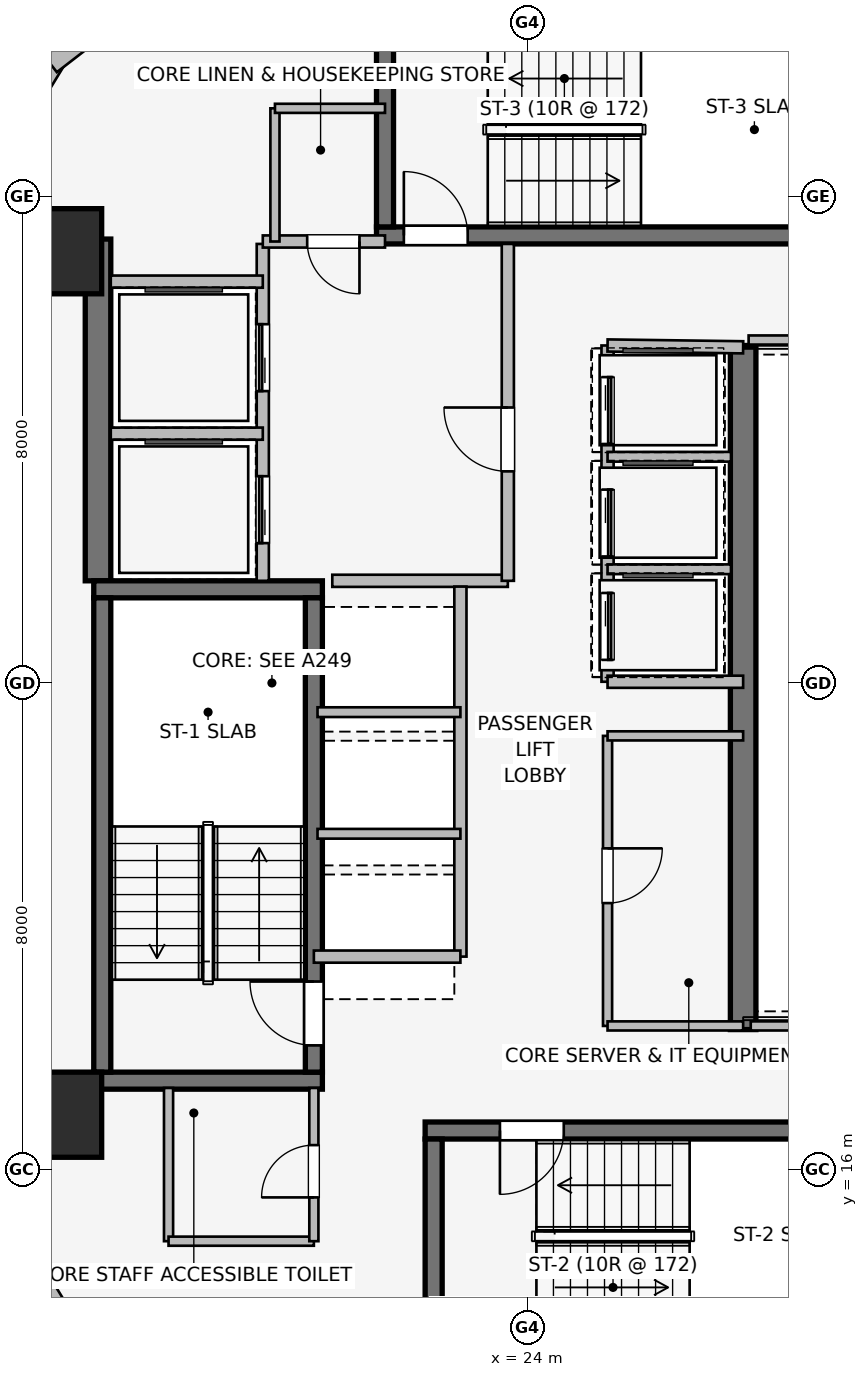
"""IFC4 building model, lengths in metres.
Left out: names, types, materials, properties, quantities, classifications, styles, units other than length and angle.
Written with IfcOpenShell. Run it as: python <this file> out.ifc"""

import sys

from ifc_helpers import new_model, si_unit, direction, frame, frame_2d, origin, origin_2d, place, context, subcontext, project, spatial, rectangle, extrude, element, fill, save


model = new_model("IFC4")
c1 = context("Model", 3, precision=1e-05, world=origin(), true_north=direction((0.0, 1.0)))
c2 = subcontext(c1, "Body", "Model", "MODEL_VIEW")
j1 = project(units=[si_unit("LENGTHUNIT", "METRE"), si_unit("PLANEANGLEUNIT", "RADIAN")], contexts=[c1])
p1 = place(None, origin())
s1 = spatial("IfcSite", under=j1, at=p1, CompositionType="ELEMENT")
p2 = place(p1, origin())
s2 = spatial("IfcBuilding", under=s1, at=p2, CompositionType="ELEMENT")
p3 = place(p2, frame((0.0, 0.0, 174.0)))
s3 = spatial("IfcBuildingStorey", under=s2, at=p3, CompositionType="ELEMENT", Elevation=174.0)
p4 = place(p3, frame((16.94, 25.68, 0.0), z_axis=(0.0, 0.0, 1.0), x_axis=(0.0, 1.0, 0.0)))
e1 = element("IfcWall", 1, at=p4, inside=s3, PredefinedType="SHEAR", context=c2, shape_type="SweptSolid", body=[
    extrude(rectangle(XDim=5.62, YDim=0.42, at=frame_2d((2.81, 0.0))), origin(), (0.0, 0.0, 1.0), 3.45),
])
p5 = place(p3, frame((27.55, 29.55, 0.0), z_axis=(0.0, 0.0, 1.0), x_axis=(0.0, -1.0, 0.0)))
e2 = element("IfcWall", 2, at=p5, inside=s3, PredefinedType="SHEAR", context=c2, shape_type="SweptSolid", body=[
    extrude(rectangle(XDim=11.25, YDim=0.42, at=frame_2d((5.625, 0.0))), origin(), (0.0, 0.0, 1.0), 3.45),
])
for number, where, z_axis, x_axis in (
    (3, (16.87, 17.46, 0.0), (0.0, 0.0, 1.0), (1.0, 0.0, 0.0)),
    (4, (20.63, 25.54, 0.0), (0.0, 0.0, 1.0), (-1.0, 0.0, 0.0)),
):
    element("IfcWall", number, at=place(p3, frame(where, z_axis=z_axis, x_axis=x_axis)), inside=s3, PredefinedType="SHEAR", context=c2, shape_type="SweptSolid", body=[
        extrude(rectangle(XDim=3.76, YDim=0.28, at=frame_2d((1.88, 0.0))), origin(), (0.0, 0.0, 1.0), 3.45),
    ])
p6 = place(p3, frame((17.01, 25.4, 0.0), z_axis=(0.0, 0.0, 1.0), x_axis=(0.0, -1.0, 0.0)))
e5 = element("IfcWall", 5, at=p6, inside=s3, PredefinedType="SHEAR", context=c2, shape_type="SweptSolid", body=[
    extrude(rectangle(XDim=7.8, YDim=0.28, at=frame_2d((3.9, 0.0))), origin(), (0.0, 0.0, 1.0), 3.45),
])
p7 = place(p3, frame((20.49, 17.6, 0.0), z_axis=(0.0, 0.0, 1.0), x_axis=(0.0, 1.0, 0.0)))
e6 = element("IfcWall", 6, at=p7, inside=s3, PredefinedType="SHEAR", context=c2, shape_type="SweptSolid", body=[
    extrude(rectangle(XDim=7.8, YDim=0.28, at=frame_2d((3.9, 0.0))), origin(), (0.0, 0.0, 1.0), 3.45),
])
p8 = place(p7, frame((0.44, 0.0, 0.0)))
e7 = element("IfcOpeningElement", 7, at=p8, cuts=e6, PredefinedType="OPENING", context=c2, shape_type="SweptSolid", body=[
    extrude(rectangle(XDim=1.05, YDim=2.0, at=frame_2d((0.525, 1.0))), frame((0.0, 0.15, 0.0), z_axis=(0.0, -1.0, 0.0), x_axis=(1.0, 0.0, 0.0)), (0.0, 0.0, 1.0), 0.3),
])
p9 = place(p3, frame((30.68, 16.64, 0.0), z_axis=(0.0, 0.0, 1.0), x_axis=(-1.0, 0.0, 0.0)))
e8 = element("IfcWall", 8, at=p9, inside=s3, PredefinedType="SHEAR", context=c2, shape_type="SweptSolid", body=[
    extrude(rectangle(XDim=8.36, YDim=0.28, at=frame_2d((4.18, 0.0))), origin(), (0.0, 0.0, 1.0), 3.45),
])
p10 = place(p9, frame((6.08, 0.0, 0.0)))
e9 = element("IfcOpeningElement", 9, at=p10, cuts=e8, PredefinedType="OPENING", context=c2, shape_type="SweptSolid", body=[
    extrude(rectangle(XDim=1.05, YDim=2.0, at=frame_2d((0.525, 1.0))), frame((0.0, 0.15, 0.0), z_axis=(0.0, -1.0, 0.0), x_axis=(1.0, 0.0, 0.0)), (0.0, 0.0, 1.0), 0.3),
])
p11 = place(p3, frame((22.46, 16.5, 0.0), z_axis=(0.0, 0.0, 1.0), x_axis=(0.0, -1.0, 0.0)))
e10 = element("IfcWall", 10, at=p11, inside=s3, PredefinedType="SHEAR", context=c2, shape_type="SweptSolid", body=[
    extrude(rectangle(XDim=3.2, YDim=0.28, at=frame_2d((1.6, 0.0))), origin(), (0.0, 0.0, 1.0), 3.45),
])
p12 = place(p3, frame((21.52, 31.36, 0.0), z_axis=(0.0, 0.0, 1.0), x_axis=(1.0, 0.0, 0.0)))
e11 = element("IfcWall", 11, at=p12, inside=s3, PredefinedType="SHEAR", context=c2, shape_type="SweptSolid", body=[
    extrude(rectangle(XDim=8.36, YDim=0.28, at=frame_2d((4.18, 0.0))), origin(), (0.0, 0.0, 1.0), 3.45),
])
p13 = place(p12, frame((0.45, 0.0, 0.0)))
e12 = element("IfcOpeningElement", 12, at=p13, cuts=e11, PredefinedType="OPENING", context=c2, shape_type="SweptSolid", body=[
    extrude(rectangle(XDim=1.05, YDim=2.0, at=frame_2d((0.525, 1.0))), frame((0.0, 0.15, 0.0), z_axis=(0.0, -1.0, 0.0), x_axis=(1.0, 0.0, 0.0)), (0.0, 0.0, 1.0), 0.3),
])
p14 = place(p3, frame((21.66, 34.7, 0.0), z_axis=(0.0, 0.0, 1.0), x_axis=(0.0, -1.0, 0.0)))
e13 = element("IfcWall", 13, at=p14, inside=s3, PredefinedType="SHEAR", context=c2, shape_type="SweptSolid", body=[
    extrude(rectangle(XDim=3.2, YDim=0.28, at=frame_2d((1.6, 0.0))), origin(), (0.0, 0.0, 1.0), 3.45),
])
for number, where, z_axis, x_axis in (
    (14, (16.3, 16.9, 0.0), (0.0, 0.0, 1.0), (1.0, 0.0, 0.0)),
    (15, (16.3, 31.1, 0.0), (0.0, 0.0, 1.0), (1.0, 0.0, 0.0)),
):
    element("IfcColumn", number, at=place(p3, frame(where, z_axis=z_axis, x_axis=x_axis)), inside=s3, PredefinedType="COLUMN", context=c2, shape_type="SweptSolid", body=[
        extrude(rectangle(XDim=1.4, YDim=1.4, at=origin_2d()), origin(), (0.0, 0.0, 1.0), 3.45),
    ])
p15 = place(p3, frame((15.415, 32.882, 0.0), z_axis=(0.0, 0.0, 1.0), x_axis=(0.520325409202, 0.853968072318, 0.0)))
e16 = element("IfcWall", 16, at=p15, inside=s3, PredefinedType="STANDARD", context=c2, shape_type="SweptSolid", body=[
    extrude(rectangle(XDim=1.678, YDim=0.33, at=frame_2d((0.839, 0.0))), origin(), (0.0, 0.0, 1.0), 3.16),
])
for number, where, z_axis, x_axis in (
    (17, (16.162, 34.175, 0.0), (0.0, 0.0, 1.0), (0.791, 0.611, 0.0)),
    (18, (17.489, 12.8, 0.0), (0.0, 0.0, 1.0), (-0.791, 0.611, 0.0)),
):
    element("IfcWall", number, at=place(p3, frame(where, z_axis=z_axis, x_axis=x_axis)), inside=s3, PredefinedType="STANDARD", context=c2, shape_type="SweptSolid", body=[
        extrude(rectangle(XDim=1.677, YDim=0.33, at=frame_2d((0.838, 0.0))), origin(), (0.0, 0.0, 1.0), 3.16),
    ])
p16 = place(p3, frame((16.288, 13.685, 0.0), z_axis=(0.0, 0.0, 1.0), x_axis=(-0.520325409202, 0.853968072318, 0.0)))
e19 = element("IfcWall", 19, at=p16, inside=s3, PredefinedType="STANDARD", context=c2, shape_type="SweptSolid", body=[
    extrude(rectangle(XDim=1.678, YDim=0.33, at=frame_2d((0.839, 0.0))), origin(), (0.0, 0.0, 1.0), 3.16),
])
p17 = place(p3, frame((19.65, 25.68, 0.0), z_axis=(0.0, 0.0, 1.0), x_axis=(0.0, 1.0, 0.0)))
e20 = element("IfcWall", 20, at=p17, inside=s3, PredefinedType="PARTITIONING", context=c2, shape_type="SweptSolid", body=[
    extrude(rectangle(XDim=5.54, YDim=0.2, at=frame_2d((2.77, 0.0))), origin(), (0.0, 0.0, 1.0), 3.16),
])
p18 = place(p17, frame((0.62, 0.0, 0.0)))
e21 = element("IfcOpeningElement", 21, at=p18, cuts=e20, PredefinedType="OPENING", context=c2, shape_type="SweptSolid", body=[
    extrude(rectangle(XDim=1.1, YDim=2.2, at=frame_2d((0.55, 1.1))), frame((0.0, 0.11, 0.0), z_axis=(0.0, -1.0, 0.0), x_axis=(1.0, 0.0, 0.0)), (0.0, 0.0, 1.0), 0.22),
])
p19 = place(p17, frame((3.12, 0.0, 0.0)))
e22 = element("IfcOpeningElement", 22, at=p19, cuts=e20, PredefinedType="OPENING", context=c2, shape_type="SweptSolid", body=[
    extrude(rectangle(XDim=1.1, YDim=2.2, at=frame_2d((0.55, 1.1))), frame((0.0, 0.11, 0.0), z_axis=(0.0, -1.0, 0.0), x_axis=(1.0, 0.0, 0.0)), (0.0, 0.0, 1.0), 0.22),
])
p20 = place(p3, frame((20.793, 25.68, 0.0), z_axis=(0.0, 0.0, 1.0), x_axis=(1.0, 0.0, 0.0)))
e23 = element("IfcWall", 23, at=p20, inside=s3, PredefinedType="PARTITIONING", context=c2, shape_type="SweptSolid", body=[
    extrude(rectangle(XDim=2.887, YDim=0.2, at=frame_2d((1.443, 0.0))), origin(), (0.0, 0.0, 1.0), 3.16),
])
p21 = place(p3, frame((23.68, 25.68, 0.0), z_axis=(0.0, 0.0, 1.0), x_axis=(0.0, 1.0, 0.0)))
e24 = element("IfcWall", 24, at=p21, inside=s3, PredefinedType="PARTITIONING", context=c2, shape_type="SweptSolid", body=[
    extrude(rectangle(XDim=5.54, YDim=0.2, at=frame_2d((2.77, 0.0))), origin(), (0.0, 0.0, 1.0), 3.16),
])
p22 = place(p21, frame((1.8, 0.0, 0.0)))
e25 = element("IfcOpeningElement", 25, at=p22, cuts=e24, PredefinedType="OPENING", context=c2, shape_type="SweptSolid", body=[
    extrude(rectangle(XDim=1.05, YDim=2.0, at=frame_2d((0.525, 1.0))), frame((0.0, 0.11, 0.0), z_axis=(0.0, -1.0, 0.0), x_axis=(1.0, 0.0, 0.0)), (0.0, 0.0, 1.0), 0.22),
])
p23 = place(p3, frame((21.66, 31.26, 0.0), z_axis=(0.0, 0.0, 1.0), x_axis=(-1.0, 0.0, 0.0)))
e26 = element("IfcWall", 26, at=p23, inside=s3, PredefinedType="PARTITIONING", context=c2, shape_type="SweptSolid", body=[
    extrude(rectangle(XDim=2.01, YDim=0.2, at=frame_2d((1.005, 0.0))), origin(), (0.0, 0.0, 1.0), 3.16),
])
p24 = place(p23, frame((0.42, 0.0, 0.0)))
e27 = element("IfcOpeningElement", 27, at=p24, cuts=e26, PredefinedType="OPENING", context=c2, shape_type="SweptSolid", body=[
    extrude(rectangle(XDim=0.86, YDim=2.0, at=frame_2d((0.43, 1.0))), frame((0.0, 0.11, 0.0), z_axis=(0.0, -1.0, 0.0), x_axis=(1.0, 0.0, 0.0)), (0.0, 0.0, 1.0), 0.22),
])
p25 = place(p3, frame((17.15, 28.1, 0.0), z_axis=(0.0, 0.0, 1.0), x_axis=(1.0, 0.0, 0.0)))
e28 = element("IfcWall", 28, at=p25, inside=s3, PredefinedType="PARTITIONING", context=c2, shape_type="SweptSolid", body=[
    extrude(rectangle(XDim=2.5, YDim=0.2, at=frame_2d((1.25, 0.0))), origin(), (0.0, 0.0, 1.0), 3.16),
])
p26 = place(p3, frame((19.65, 30.6, 0.0), z_axis=(0.0, 0.0, 1.0), x_axis=(-1.0, 0.0, 0.0)))
e29 = element("IfcWall", 29, at=p26, inside=s3, PredefinedType="PARTITIONING", context=c2, shape_type="SweptSolid", body=[
    extrude(rectangle(XDim=2.5, YDim=0.2, at=frame_2d((1.25, 0.0))), origin(), (0.0, 0.0, 1.0), 2.06),
])
p27 = place(p3, frame((22.9, 19.5, 0.0), z_axis=(0.0, 0.0, 1.0), x_axis=(0.0, 1.0, 0.0)))
e30 = element("IfcWall", 30, at=p27, inside=s3, PredefinedType="PARTITIONING", context=c2, shape_type="SweptSolid", body=[
    extrude(rectangle(XDim=6.085, YDim=0.2, at=frame_2d((3.042, 0.0))), origin(), (0.0, 0.0, 1.0), 3.16),
])
p28 = place(p3, frame((20.49, 19.5, 0.0), z_axis=(0.0, 0.0, 1.0), x_axis=(1.0, 0.0, 0.0)))
e31 = element("IfcWall", 31, at=p28, inside=s3, PredefinedType="PARTITIONING", context=c2, shape_type="SweptSolid", body=[
    extrude(rectangle(XDim=2.41, YDim=0.2, at=frame_2d((1.205, 0.0))), origin(), (0.0, 0.0, 1.0), 2.06),
])
for number, where, z_axis, x_axis in (
    (32, (20.55, 21.52, 0.0), (0.0, 0.0, 1.0), (1.0, 0.0, 0.0)),
    (33, (20.55, 23.52, 0.0), (0.0, 0.0, 1.0), (1.0, 0.0, 0.0)),
):
    element("IfcWall", number, at=place(p3, frame(where, z_axis=z_axis, x_axis=x_axis)), inside=s3, PredefinedType="PARTITIONING", context=c2, shape_type="SweptSolid", body=[
        extrude(rectangle(XDim=2.35, YDim=0.16, at=frame_2d((1.175, 0.0))), origin(), (0.0, 0.0, 1.0), 3.16),
    ])
p29 = place(p3, frame((25.32, 29.55, 0.0), z_axis=(0.0, 0.0, 1.0), x_axis=(0.0, -1.0, 0.0)))
e34 = element("IfcWall", 34, at=p29, inside=s3, PredefinedType="PARTITIONING", context=c2, shape_type="SweptSolid", body=[
    extrude(rectangle(XDim=5.53, YDim=0.2, at=frame_2d((2.765, 0.0))), origin(), (0.0, 0.0, 1.0), 3.16),
])
p30 = place(p29, frame((0.52, 0.0, 0.0)))
e35 = element("IfcOpeningElement", 35, at=p30, cuts=e34, PredefinedType="OPENING", context=c2, shape_type="SweptSolid", body=[
    extrude(rectangle(XDim=1.1, YDim=2.2, at=frame_2d((0.55, 1.1))), frame((0.0, 0.11, 0.0), z_axis=(0.0, -1.0, 0.0), x_axis=(1.0, 0.0, 0.0)), (0.0, 0.0, 1.0), 0.22),
])
p31 = place(p29, frame((2.37, 0.0, 0.0)))
e36 = element("IfcOpeningElement", 36, at=p31, cuts=e34, PredefinedType="OPENING", context=c2, shape_type="SweptSolid", body=[
    extrude(rectangle(XDim=1.1, YDim=2.2, at=frame_2d((0.55, 1.1))), frame((0.0, 0.11, 0.0), z_axis=(0.0, -1.0, 0.0), x_axis=(1.0, 0.0, 0.0)), (0.0, 0.0, 1.0), 0.22),
])
p32 = place(p29, frame((4.07, 0.0, 0.0)))
e37 = element("IfcOpeningElement", 37, at=p32, cuts=e34, PredefinedType="OPENING", context=c2, shape_type="SweptSolid", body=[
    extrude(rectangle(XDim=1.1, YDim=2.2, at=frame_2d((0.55, 1.1))), frame((0.0, 0.11, 0.0), z_axis=(0.0, -1.0, 0.0), x_axis=(1.0, 0.0, 0.0)), (0.0, 0.0, 1.0), 0.22),
])
p33 = place(p3, frame((27.55, 29.52, 0.0), z_axis=(0.0, 0.0, 1.0), x_axis=(-0.999909343457, 0.013464949556, 0.0)))
e38 = element("IfcWall", 38, at=p33, inside=s3, PredefinedType="PARTITIONING", context=c2, shape_type="SweptSolid", body=[
    extrude(rectangle(XDim=2.23, YDim=0.2, at=frame_2d((1.115, 0.0))), origin(), (0.0, 0.0, 1.0), 2.06),
])
p34 = place(p3, frame((25.32, 24.02, 0.0), z_axis=(0.0, 0.0, 1.0), x_axis=(1.0, 0.0, 0.0)))
e39 = element("IfcWall", 39, at=p34, inside=s3, PredefinedType="PARTITIONING", context=c2, shape_type="SweptSolid", body=[
    extrude(rectangle(XDim=2.23, YDim=0.2, at=frame_2d((1.115, 0.0))), origin(), (0.0, 0.0, 1.0), 3.16),
])
for number, where, z_axis, x_axis in (
    (40, (25.32, 25.87, 0.0), (0.0, 0.0, 1.0), (1.0, 0.0, 0.0)),
    (41, (25.32, 27.72, 0.0), (0.0, 0.0, 1.0), (1.0, 0.0, 0.0)),
):
    element("IfcWall", number, at=place(p3, frame(where, z_axis=z_axis, x_axis=x_axis)), inside=s3, PredefinedType="PARTITIONING", context=c2, shape_type="SweptSolid", body=[
        extrude(rectangle(XDim=2.03, YDim=0.16, at=frame_2d((1.015, 0.0))), origin(), (0.0, 0.0, 1.0), 3.16),
    ])
p35 = place(p3, frame((25.32, 23.13, 0.0), z_axis=(0.0, 0.0, 1.0), x_axis=(0.0, -1.0, 0.0)))
e42 = element("IfcWall", 42, at=p35, inside=s3, PredefinedType="PARTITIONING", context=c2, shape_type="SweptSolid", body=[
    extrude(rectangle(XDim=4.77, YDim=0.15, at=frame_2d((2.385, 0.0))), origin(), (0.0, 0.0, 1.0), 3.16),
])
p36 = place(p35, frame((1.85, 0.0, 0.0)))
e43 = element("IfcOpeningElement", 43, at=p36, cuts=e42, PredefinedType="OPENING", context=c2, shape_type="SweptSolid", body=[
    extrude(rectangle(XDim=0.9, YDim=2.0, at=frame_2d((0.45, 1.0))), frame((0.0, 0.085, 0.0), z_axis=(0.0, -1.0, 0.0), x_axis=(1.0, 0.0, 0.0)), (0.0, 0.0, 1.0), 0.17),
])
for number, where, z_axis, x_axis in (
    (44, (25.32, 23.13, 0.0), (0.0, 0.0, 1.0), (1.0, 0.0, 0.0)),
    (45, (25.32, 18.36, 0.0), (0.0, 0.0, 1.0), (1.0, 0.0, 0.0)),
):
    element("IfcWall", number, at=place(p3, frame(where, z_axis=z_axis, x_axis=x_axis)), inside=s3, PredefinedType="PARTITIONING", context=c2, shape_type="SweptSolid", body=[
        extrude(rectangle(XDim=2.23, YDim=0.15, at=frame_2d((1.115, 0.0))), origin(), (0.0, 0.0, 1.0), 3.16),
    ])
p37 = place(p3, frame((18.1, 17.34, 0.0), z_axis=(0.0, 0.0, 1.0), x_axis=(0.0, -1.0, 0.0)))
e46 = element("IfcWall", 46, at=p37, inside=s3, PredefinedType="PARTITIONING", context=c2, shape_type="SweptSolid", body=[
    extrude(rectangle(XDim=2.52, YDim=0.15, at=frame_2d((1.26, 0.0))), origin(), (0.0, 0.0, 1.0), 3.16),
])
p38 = place(p3, frame((18.1, 14.82, 0.0), z_axis=(0.0, 0.0, 1.0), x_axis=(1.0, 0.0, 0.0)))
e47 = element("IfcWall", 47, at=p38, inside=s3, PredefinedType="PARTITIONING", context=c2, shape_type="SweptSolid", body=[
    extrude(rectangle(XDim=2.39, YDim=0.15, at=frame_2d((1.195, 0.0))), origin(), (0.0, 0.0, 1.0), 3.16),
])
p39 = place(p3, frame((20.49, 14.82, 0.0), z_axis=(0.0, 0.0, 1.0), x_axis=(0.0, 1.0, 0.0)))
e48 = element("IfcWall", 48, at=p39, inside=s3, PredefinedType="PARTITIONING", context=c2, shape_type="SweptSolid", body=[
    extrude(rectangle(XDim=2.52, YDim=0.15, at=frame_2d((1.26, 0.0))), origin(), (0.0, 0.0, 1.0), 3.16),
])
p40 = place(p39, frame((0.72, 0.0, 0.0)))
e49 = element("IfcOpeningElement", 49, at=p40, cuts=e48, PredefinedType="OPENING", context=c2, shape_type="SweptSolid", body=[
    extrude(rectangle(XDim=0.86, YDim=2.0, at=frame_2d((0.43, 1.0))), frame((0.0, 0.085, 0.0), z_axis=(0.0, -1.0, 0.0), x_axis=(1.0, 0.0, 0.0)), (0.0, 0.0, 1.0), 0.17),
])
p41 = place(p3, frame((19.85, 33.45, 0.0), z_axis=(0.0, 0.0, 1.0), x_axis=(0.0, -1.0, 0.0)))
e50 = element("IfcWall", 50, at=p41, inside=s3, PredefinedType="PARTITIONING", context=c2, shape_type="SweptSolid", body=[
    extrude(rectangle(XDim=2.19, YDim=0.15, at=frame_2d((1.095, 0.0))), origin(), (0.0, 0.0, 1.0), 3.16),
])
p42 = place(p3, frame((21.66, 33.45, 0.0), z_axis=(0.0, 0.0, 1.0), x_axis=(-1.0, 0.0, 0.0)))
e51 = element("IfcWall", 51, at=p42, inside=s3, PredefinedType="PARTITIONING", context=c2, shape_type="SweptSolid", body=[
    extrude(rectangle(XDim=1.81, YDim=0.15, at=frame_2d((0.905, 0.0))), origin(), (0.0, 0.0, 1.0), 3.16),
])
p43 = place(p3, frame((27.675, 18.36, 0.0), z_axis=(0.0, 0.0, 1.0), x_axis=(1.0, 0.0, 0.0)))
e52 = element("IfcWall", 52, at=p43, inside=s3, PredefinedType="PARTITIONING", context=c2, shape_type="SweptSolid", body=[
    extrude(rectangle(XDim=12.165, YDim=0.15, at=frame_2d((6.083, 0.0))), origin(), (0.0, 0.0, 1.0), 2.301),
])
p44 = place(p3, frame((39.84, 29.64, 0.0), z_axis=(0.0, 0.0, 1.0), x_axis=(-1.0, 0.0, 0.0)))
e53 = element("IfcWall", 53, at=p44, inside=s3, PredefinedType="PARTITIONING", context=c2, shape_type="SweptSolid", body=[
    extrude(rectangle(XDim=12.2, YDim=0.15, at=frame_2d((6.1, 0.0))), origin(), (0.0, 0.0, 1.0), 2.301),
])
p45 = place(p8, origin())
e54 = element("IfcDoor", 54, at=p45, inside=s3, OperationType="SINGLE_SWING_RIGHT", PredefinedType="DOOR", context=c2, shape_type="SweptSolid", body=[
    extrude(rectangle(XDim=1.05, YDim=2.0, at=frame_2d((0.525, 1.0))), frame((0.0, 0.025, 0.0), z_axis=(0.0, -1.0, 0.0), x_axis=(1.0, 0.0, 0.0)), (0.0, 0.0, 1.0), 0.05),
])
fill(e7, e54)
p46 = place(p10, origin())
e55 = element("IfcDoor", 55, at=p46, inside=s3, OperationType="SINGLE_SWING_RIGHT", PredefinedType="DOOR", context=c2, shape_type="SweptSolid", body=[
    extrude(rectangle(XDim=1.05, YDim=2.0, at=frame_2d((0.525, 1.0))), frame((0.0, 0.025, 0.0), z_axis=(0.0, -1.0, 0.0), x_axis=(1.0, 0.0, 0.0)), (0.0, 0.0, 1.0), 0.05),
])
fill(e9, e55)
p47 = place(p13, origin())
e56 = element("IfcDoor", 56, at=p47, inside=s3, OperationType="SINGLE_SWING_LEFT", PredefinedType="DOOR", context=c2, shape_type="SweptSolid", body=[
    extrude(rectangle(XDim=1.05, YDim=2.0, at=frame_2d((0.525, 1.0))), frame((0.0, 0.025, 0.0), z_axis=(0.0, -1.0, 0.0), x_axis=(1.0, 0.0, 0.0)), (0.0, 0.0, 1.0), 0.05),
])
fill(e12, e56)
p48 = place(p18, origin())
e57 = element("IfcDoor", 57, at=p48, inside=s3, OperationType="SLIDING_TO_LEFT", PredefinedType="DOOR", context=c2, shape_type="SweptSolid", body=[
    extrude(rectangle(XDim=1.1, YDim=2.2, at=frame_2d((0.55, 1.1))), frame((0.0, 0.025, 0.0), z_axis=(0.0, -1.0, 0.0), x_axis=(1.0, 0.0, 0.0)), (0.0, 0.0, 1.0), 0.05),
])
fill(e21, e57)
p49 = place(p19, origin())
e58 = element("IfcDoor", 58, at=p49, inside=s3, OperationType="SLIDING_TO_LEFT", PredefinedType="DOOR", context=c2, shape_type="SweptSolid", body=[
    extrude(rectangle(XDim=1.1, YDim=2.2, at=frame_2d((0.55, 1.1))), frame((0.0, 0.025, 0.0), z_axis=(0.0, -1.0, 0.0), x_axis=(1.0, 0.0, 0.0)), (0.0, 0.0, 1.0), 0.05),
])
fill(e22, e58)
p50 = place(p22, origin())
e59 = element("IfcDoor", 59, at=p50, inside=s3, OperationType="SINGLE_SWING_RIGHT", PredefinedType="DOOR", context=c2, shape_type="SweptSolid", body=[
    extrude(rectangle(XDim=1.05, YDim=2.0, at=frame_2d((0.525, 1.0))), frame((0.0, 0.025, 0.0), z_axis=(0.0, -1.0, 0.0), x_axis=(1.0, 0.0, 0.0)), (0.0, 0.0, 1.0), 0.05),
])
fill(e25, e59)
p51 = place(p24, origin())
e60 = element("IfcDoor", 60, at=p51, inside=s3, OperationType="SINGLE_SWING_LEFT", PredefinedType="DOOR", context=c2, shape_type="SweptSolid", body=[
    extrude(rectangle(XDim=0.86, YDim=2.0, at=frame_2d((0.43, 1.0))), frame((0.0, 0.025, 0.0), z_axis=(0.0, -1.0, 0.0), x_axis=(1.0, 0.0, 0.0)), (0.0, 0.0, 1.0), 0.05),
])
fill(e27, e60)
p52 = place(p30, origin())
e61 = element("IfcDoor", 61, at=p52, inside=s3, OperationType="SLIDING_TO_LEFT", PredefinedType="DOOR", context=c2, shape_type="SweptSolid", body=[
    extrude(rectangle(XDim=1.1, YDim=2.2, at=frame_2d((0.55, 1.1))), frame((0.0, 0.025, 0.0), z_axis=(0.0, -1.0, 0.0), x_axis=(1.0, 0.0, 0.0)), (0.0, 0.0, 1.0), 0.05),
])
fill(e35, e61)
p53 = place(p31, origin())
e62 = element("IfcDoor", 62, at=p53, inside=s3, OperationType="SLIDING_TO_LEFT", PredefinedType="DOOR", context=c2, shape_type="SweptSolid", body=[
    extrude(rectangle(XDim=1.1, YDim=2.2, at=frame_2d((0.55, 1.1))), frame((0.0, 0.025, 0.0), z_axis=(0.0, -1.0, 0.0), x_axis=(1.0, 0.0, 0.0)), (0.0, 0.0, 1.0), 0.05),
])
fill(e36, e62)
p54 = place(p32, origin())
e63 = element("IfcDoor", 63, at=p54, inside=s3, OperationType="SLIDING_TO_LEFT", PredefinedType="DOOR", context=c2, shape_type="SweptSolid", body=[
    extrude(rectangle(XDim=1.1, YDim=2.2, at=frame_2d((0.55, 1.1))), frame((0.0, 0.025, 0.0), z_axis=(0.0, -1.0, 0.0), x_axis=(1.0, 0.0, 0.0)), (0.0, 0.0, 1.0), 0.05),
])
fill(e37, e63)
p55 = place(p36, origin())
e64 = element("IfcDoor", 64, at=p55, inside=s3, OperationType="SINGLE_SWING_LEFT", PredefinedType="DOOR", context=c2, shape_type="SweptSolid", body=[
    extrude(rectangle(XDim=0.9, YDim=2.0, at=frame_2d((0.45, 1.0))), frame((0.0, 0.025, 0.0), z_axis=(0.0, -1.0, 0.0), x_axis=(1.0, 0.0, 0.0)), (0.0, 0.0, 1.0), 0.05),
])
fill(e43, e64)
p56 = place(p40, origin())
e65 = element("IfcDoor", 65, at=p56, inside=s3, OperationType="SINGLE_SWING_LEFT", PredefinedType="DOOR", context=c2, shape_type="SweptSolid", body=[
    extrude(rectangle(XDim=0.86, YDim=2.0, at=frame_2d((0.43, 1.0))), frame((0.0, 0.025, 0.0), z_axis=(0.0, -1.0, 0.0), x_axis=(1.0, 0.0, 0.0)), (0.0, 0.0, 1.0), 0.05),
])
fill(e49, e65)
save(model, sys.argv[1])
